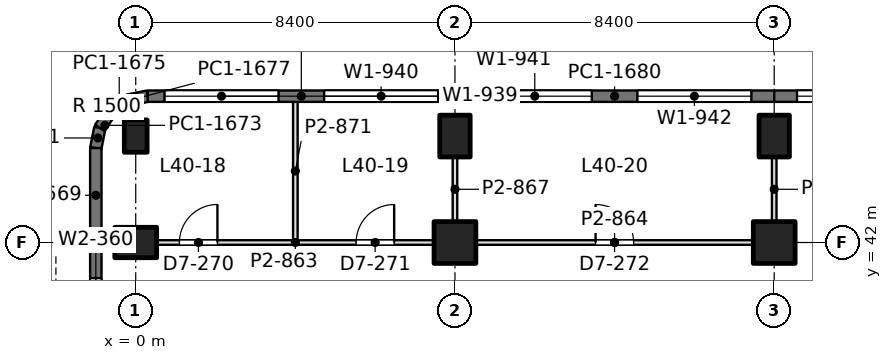
"""IFC4 building model, lengths in metres.
Left out: names, types, materials, properties, quantities, classifications, styles, units other than length and angle.
Written with IfcOpenShell. Run it as: python <this file> out.ifc"""

import sys

from ifc_helpers import new_model, si_unit, direction, frame, frame_2d, origin, origin_2d, place, context, subcontext, project, spatial, rectangle, extrude, element, fill, save


model = new_model("IFC4")
c1 = context("Model", 3, precision=1e-05, world=origin(), true_north=direction((0.0, 1.0)))
c2 = subcontext(c1, "Body", "Model", "MODEL_VIEW")
j1 = project(units=[si_unit("LENGTHUNIT", "METRE"), si_unit("PLANEANGLEUNIT", "RADIAN")], contexts=[c1])
p1 = place(None, origin())
s1 = spatial("IfcSite", under=j1, at=p1, CompositionType="ELEMENT")
p2 = place(p1, origin())
s2 = spatial("IfcBuilding", under=s1, at=p2, CompositionType="ELEMENT")
p3 = place(p2, frame((0.0, 0.0, 177.6)))
s3 = spatial("IfcBuildingStorey", under=s2, at=p3, CompositionType="ELEMENT", Elevation=177.6)
p4 = place(p3, frame((0.0, 42.0, 0.0), z_axis=(0.0, 0.0, 1.0), x_axis=(0.0, 1.0, 0.0)))
e1 = element("IfcColumn", 1, at=p4, inside=s3, PredefinedType="COLUMN", context=c2, shape_type="SweptSolid", body=[
    extrude(rectangle(XDim=0.8, YDim=1.1, at=origin_2d()), origin(), (0.0, 0.0, 1.0), 4.2),
])
p5 = place(p3, frame((0.0, 44.8, 0.0), z_axis=(0.0, 0.0, 1.0), x_axis=(1.0, 0.0, 0.0)))
e2 = element("IfcColumn", 2, at=p5, inside=s3, PredefinedType="COLUMN", context=c2, shape_type="SweptSolid", body=[
    extrude(rectangle(XDim=0.6, YDim=0.85, at=origin_2d()), origin(), (0.0, 0.0, 1.0), 4.2),
])
p6 = place(p3, frame((8.4, 42.0, 0.0), z_axis=(0.0, 0.0, 1.0), x_axis=(1.0, 0.0, 0.0)))
e3 = element("IfcColumn", 3, at=p6, inside=s3, PredefinedType="COLUMN", context=c2, shape_type="SweptSolid", body=[
    extrude(rectangle(XDim=1.1, YDim=1.1, at=origin_2d()), origin(), (0.0, 0.0, 1.0), 4.2),
])
p7 = place(p3, frame((8.4, 44.8, 0.0), z_axis=(0.0, 0.0, 1.0), x_axis=(1.0, 0.0, 0.0)))
e4 = element("IfcColumn", 4, at=p7, inside=s3, PredefinedType="COLUMN", context=c2, shape_type="SweptSolid", body=[
    extrude(rectangle(XDim=0.8, YDim=1.1, at=origin_2d()), origin(), (0.0, 0.0, 1.0), 4.2),
])
p8 = place(p3, frame((16.8, 42.0, 0.0), z_axis=(0.0, 0.0, 1.0), x_axis=(1.0, 0.0, 0.0)))
e5 = element("IfcColumn", 5, at=p8, inside=s3, PredefinedType="COLUMN", context=c2, shape_type="SweptSolid", body=[
    extrude(rectangle(XDim=1.1, YDim=1.1, at=origin_2d()), origin(), (0.0, 0.0, 1.0), 4.2),
])
p9 = place(p3, frame((16.8, 44.8, 0.0), z_axis=(0.0, 0.0, 1.0), x_axis=(1.0, 0.0, 0.0)))
e6 = element("IfcColumn", 6, at=p9, inside=s3, PredefinedType="COLUMN", context=c2, shape_type="SweptSolid", body=[
    extrude(rectangle(XDim=0.8, YDim=1.1, at=origin_2d()), origin(), (0.0, 0.0, 1.0), 4.2),
])
p10 = place(p3, frame((-1.05, 37.725, 0.0), z_axis=(0.0, 0.0, 1.0), x_axis=(0.0, 1.0, 0.0)))
e7 = element("IfcWall", 7, at=p10, inside=s3, PredefinedType="SOLIDWALL", context=c2, shape_type="SweptSolid", body=[
    extrude(rectangle(XDim=4.275, YDim=0.3, at=frame_2d((2.137, 0.0))), origin(), (0.0, 0.0, 1.0), 4.05),
])
p11 = place(p10, frame((0.938, 0.0, 0.9)))
e8 = element("IfcOpeningElement", 8, at=p11, cuts=e7, PredefinedType="OPENING", context=c2, shape_type="SweptSolid", body=[
    extrude(rectangle(XDim=2.4, YDim=1.9, at=frame_2d((1.2, 0.95))), frame((0.0, 0.16, 0.0), z_axis=(0.0, -1.0, 0.0), x_axis=(1.0, 0.0, 0.0)), (0.0, 0.0, 1.0), 0.32),
])
p12 = place(p3, frame((-1.05, 42.0, 0.0), z_axis=(0.0, 0.0, 1.0), x_axis=(0.0, 1.0, 0.0)))
e9 = element("IfcWall", 9, at=p12, inside=s3, PredefinedType="SOLIDWALL", context=c2, shape_type="SweptSolid", body=[
    extrude(rectangle(XDim=2.485, YDim=0.3, at=frame_2d((1.243, 0.0))), origin(), (0.0, 0.0, 1.0), 4.05),
])
p13 = place(p3, frame((-1.05, 44.485, 0.0), z_axis=(0.0, 0.0, 1.0), x_axis=(0.195073962632, 0.980788534345, 0.0)))
e10 = element("IfcWall", 10, at=p13, inside=s3, PredefinedType="SOLIDWALL", context=c2, shape_type="SweptSolid", body=[
    extrude(rectangle(XDim=0.541, YDim=0.3, at=frame_2d((0.271, 0.0))), origin(), (0.0, 0.0, 1.0), 4.05),
])
p14 = place(p3, frame((-0.945, 45.015, 0.0), z_axis=(0.0, 0.0, 1.0), x_axis=(0.55534295404, 0.831621430339, 0.0)))
e11 = element("IfcWall", 11, at=p14, inside=s3, PredefinedType="SOLIDWALL", context=c2, shape_type="SweptSolid", body=[
    extrude(rectangle(XDim=0.526, YDim=0.3, at=frame_2d((0.263, 0.0))), origin(), (0.0, 0.0, 1.0), 4.05),
])
p15 = place(p3, frame((-0.653, 45.453, 0.0), z_axis=(0.0, 0.0, 1.0), x_axis=(0.831692711774, 0.555236195849, 0.0)))
e12 = element("IfcWall", 12, at=p15, inside=s3, PredefinedType="SOLIDWALL", context=c2, shape_type="SweptSolid", body=[
    extrude(rectangle(XDim=0.525, YDim=0.3, at=frame_2d((0.263, 0.0))), origin(), (0.0, 0.0, 1.0), 4.05),
])
p16 = place(p3, frame((-0.216, 45.744, 0.0), z_axis=(0.0, 0.0, 1.0), x_axis=(0.980702050465, 0.1955082817, 0.0)))
e13 = element("IfcWall", 13, at=p16, inside=s3, PredefinedType="SOLIDWALL", context=c2, shape_type="SweptSolid", body=[
    extrude(rectangle(XDim=0.541, YDim=0.3, at=frame_2d((0.271, 0.0))), origin(), (0.0, 0.0, 1.0), 4.05),
])
p17 = place(p3, frame((0.315, 45.85, 0.0), z_axis=(0.0, 0.0, 1.0), x_axis=(1.0, 0.0, 0.0)))
e14 = element("IfcWall", 14, at=p17, inside=s3, PredefinedType="SOLIDWALL", context=c2, shape_type="SweptSolid", body=[
    extrude(rectangle(XDim=8.085, YDim=0.3, at=frame_2d((4.042, 0.0))), origin(), (0.0, 0.0, 1.0), 4.05),
])
p18 = place(p17, frame((0.443, 0.0, 0.9)))
e15 = element("IfcOpeningElement", 15, at=p18, cuts=e14, PredefinedType="OPENING", context=c2, shape_type="SweptSolid", body=[
    extrude(rectangle(XDim=3.0, YDim=1.9, at=frame_2d((1.5, 0.95))), frame((0.0, 0.16, 0.0), z_axis=(0.0, -1.0, 0.0), x_axis=(1.0, 0.0, 0.0)), (0.0, 0.0, 1.0), 0.32),
])
p19 = place(p17, frame((4.643, 0.0, 0.9)))
e16 = element("IfcOpeningElement", 16, at=p19, cuts=e14, PredefinedType="OPENING", context=c2, shape_type="SweptSolid", body=[
    extrude(rectangle(XDim=3.0, YDim=1.9, at=frame_2d((1.5, 0.95))), frame((0.0, 0.16, 0.0), z_axis=(0.0, -1.0, 0.0), x_axis=(1.0, 0.0, 0.0)), (0.0, 0.0, 1.0), 0.32),
])
p20 = place(p3, frame((8.4, 45.85, 0.0), z_axis=(0.0, 0.0, 1.0), x_axis=(1.0, 0.0, 0.0)))
e17 = element("IfcWall", 17, at=p20, inside=s3, PredefinedType="SOLIDWALL", context=c2, shape_type="SweptSolid", body=[
    extrude(rectangle(XDim=8.4, YDim=0.3, at=frame_2d((4.2, 0.0))), origin(), (0.0, 0.0, 1.0), 4.05),
])
p21 = place(p20, frame((0.6, 0.0, 0.9)))
e18 = element("IfcOpeningElement", 18, at=p21, cuts=e17, PredefinedType="OPENING", context=c2, shape_type="SweptSolid", body=[
    extrude(rectangle(XDim=3.0, YDim=1.9, at=frame_2d((1.5, 0.95))), frame((0.0, 0.16, 0.0), z_axis=(0.0, -1.0, 0.0), x_axis=(1.0, 0.0, 0.0)), (0.0, 0.0, 1.0), 0.32),
])
p22 = place(p20, frame((4.8, 0.0, 0.9)))
e19 = element("IfcOpeningElement", 19, at=p22, cuts=e17, PredefinedType="OPENING", context=c2, shape_type="SweptSolid", body=[
    extrude(rectangle(XDim=3.0, YDim=1.9, at=frame_2d((1.5, 0.95))), frame((0.0, 0.16, 0.0), z_axis=(0.0, -1.0, 0.0), x_axis=(1.0, 0.0, 0.0)), (0.0, 0.0, 1.0), 0.32),
])
p23 = place(p3, frame((16.8, 45.85, 0.0), z_axis=(0.0, 0.0, 1.0), x_axis=(1.0, 0.0, 0.0)))
e20 = element("IfcWall", 20, at=p23, inside=s3, PredefinedType="SOLIDWALL", context=c2, shape_type="SweptSolid", body=[
    extrude(rectangle(XDim=8.4, YDim=0.3, at=frame_2d((4.2, 0.0))), origin(), (0.0, 0.0, 1.0), 4.05),
])
p24 = place(p23, frame((0.6, 0.0, 0.9)))
e21 = element("IfcOpeningElement", 21, at=p24, cuts=e20, PredefinedType="OPENING", context=c2, shape_type="SweptSolid", body=[
    extrude(rectangle(XDim=3.0, YDim=1.9, at=frame_2d((1.5, 0.95))), frame((0.0, 0.16, 0.0), z_axis=(0.0, -1.0, 0.0), x_axis=(1.0, 0.0, 0.0)), (0.0, 0.0, 1.0), 0.32),
])
p25 = place(p23, frame((4.8, 0.0, 0.9)))
e22 = element("IfcOpeningElement", 22, at=p25, cuts=e20, PredefinedType="OPENING", context=c2, shape_type="SweptSolid", body=[
    extrude(rectangle(XDim=3.0, YDim=1.9, at=frame_2d((1.5, 0.95))), frame((0.0, 0.16, 0.0), z_axis=(0.0, -1.0, 0.0), x_axis=(1.0, 0.0, 0.0)), (0.0, 0.0, 1.0), 0.32),
])
p26 = place(p3, frame((0.549, 42.0, 0.0), z_axis=(0.0, 0.0, 1.0), x_axis=(1.0, 0.0, 0.0)))
e23 = element("IfcWall", 23, at=p26, inside=s3, PredefinedType="PARTITIONING", context=c2, shape_type="SweptSolid", body=[
    extrude(rectangle(XDim=7.302, YDim=0.12, at=frame_2d((3.651, 0.0))), origin(), (0.0, 0.0, 1.0), 3.55),
])
p27 = place(p26, frame((0.601, 0.0, 0.0)))
e24 = element("IfcOpeningElement", 24, at=p27, cuts=e23, PredefinedType="OPENING", context=c2, shape_type="SweptSolid", body=[
    extrude(rectangle(XDim=1.0, YDim=2.4, at=frame_2d((0.5, 1.2))), frame((0.0, 0.07, 0.0), z_axis=(0.0, -1.0, 0.0), x_axis=(1.0, 0.0, 0.0)), (0.0, 0.0, 1.0), 0.14),
])
p28 = place(p26, frame((5.251, 0.0, 0.0)))
e25 = element("IfcOpeningElement", 25, at=p28, cuts=e23, PredefinedType="OPENING", context=c2, shape_type="SweptSolid", body=[
    extrude(rectangle(XDim=1.0, YDim=2.4, at=frame_2d((0.5, 1.2))), frame((0.0, 0.07, 0.0), z_axis=(0.0, -1.0, 0.0), x_axis=(1.0, 0.0, 0.0)), (0.0, 0.0, 1.0), 0.14),
])
p29 = place(p3, frame((8.949, 42.0, 0.0), z_axis=(0.0, 0.0, 1.0), x_axis=(1.0, 0.0, 0.0)))
e26 = element("IfcWall", 26, at=p29, inside=s3, PredefinedType="PARTITIONING", context=c2, shape_type="SweptSolid", body=[
    extrude(rectangle(XDim=7.302, YDim=0.12, at=frame_2d((3.651, 0.0))), origin(), (0.0, 0.0, 1.0), 3.55),
])
p30 = place(p29, frame((3.151, 0.0, 0.0)))
e27 = element("IfcOpeningElement", 27, at=p30, cuts=e26, PredefinedType="OPENING", context=c2, shape_type="SweptSolid", body=[
    extrude(rectangle(XDim=1.0, YDim=2.4, at=frame_2d((0.5, 1.2))), frame((0.0, 0.07, 0.0), z_axis=(0.0, -1.0, 0.0), x_axis=(1.0, 0.0, 0.0)), (0.0, 0.0, 1.0), 0.14),
])
p31 = place(p3, frame((4.2, 42.058, 0.0), z_axis=(0.0, 0.0, 1.0), x_axis=(0.0, 1.0, 0.0)))
e28 = element("IfcWall", 28, at=p31, inside=s3, PredefinedType="PARTITIONING", context=c2, shape_type="SweptSolid", body=[
    extrude(rectangle(XDim=3.644, YDim=0.12, at=frame_2d((1.822, 0.0))), origin(), (0.0, 0.0, 1.0), 3.55),
])
for number, where, z_axis, x_axis in (
    (29, (8.4, 42.549, 0.0), (0.0, 0.0, 1.0), (0.0, 1.0, 0.0)),
    (30, (16.8, 42.549, 0.0), (0.0, 0.0, 1.0), (0.0, 1.0, 0.0)),
):
    element("IfcWall", number, at=place(p3, frame(where, z_axis=z_axis, x_axis=x_axis)), inside=s3, PredefinedType="PARTITIONING", context=c2, shape_type="SweptSolid", body=[
        extrude(rectangle(XDim=1.702, YDim=0.12, at=frame_2d((0.851, 0.0))), origin(), (0.0, 0.0, 1.0), 3.69),
    ])
p32 = place(p11, origin())
e31 = element("IfcWindow", 31, at=p32, inside=s3, PartitioningType="SINGLE_PANEL", PredefinedType="WINDOW", context=c2, shape_type="SweptSolid", body=[
    extrude(rectangle(XDim=2.4, YDim=1.9, at=frame_2d((1.2, 0.95))), frame((0.0, 0.03, 0.0), z_axis=(0.0, -1.0, 0.0), x_axis=(1.0, 0.0, 0.0)), (0.0, 0.0, 1.0), 0.06),
])
fill(e8, e31)
p33 = place(p18, origin())
e32 = element("IfcWindow", 32, at=p33, inside=s3, PartitioningType="SINGLE_PANEL", PredefinedType="WINDOW", context=c2, shape_type="SweptSolid", body=[
    extrude(rectangle(XDim=3.0, YDim=1.9, at=frame_2d((1.5, 0.95))), frame((0.0, 0.03, 0.0), z_axis=(0.0, -1.0, 0.0), x_axis=(1.0, 0.0, 0.0)), (0.0, 0.0, 1.0), 0.06),
])
fill(e15, e32)
p34 = place(p19, origin())
e33 = element("IfcWindow", 33, at=p34, inside=s3, PartitioningType="SINGLE_PANEL", PredefinedType="WINDOW", context=c2, shape_type="SweptSolid", body=[
    extrude(rectangle(XDim=3.0, YDim=1.9, at=frame_2d((1.5, 0.95))), frame((0.0, 0.03, 0.0), z_axis=(0.0, -1.0, 0.0), x_axis=(1.0, 0.0, 0.0)), (0.0, 0.0, 1.0), 0.06),
])
fill(e16, e33)
p35 = place(p21, origin())
e34 = element("IfcWindow", 34, at=p35, inside=s3, PartitioningType="SINGLE_PANEL", PredefinedType="WINDOW", context=c2, shape_type="SweptSolid", body=[
    extrude(rectangle(XDim=3.0, YDim=1.9, at=frame_2d((1.5, 0.95))), frame((0.0, 0.03, 0.0), z_axis=(0.0, -1.0, 0.0), x_axis=(1.0, 0.0, 0.0)), (0.0, 0.0, 1.0), 0.06),
])
fill(e18, e34)
p36 = place(p22, origin())
e35 = element("IfcWindow", 35, at=p36, inside=s3, PartitioningType="SINGLE_PANEL", PredefinedType="WINDOW", context=c2, shape_type="SweptSolid", body=[
    extrude(rectangle(XDim=3.0, YDim=1.9, at=frame_2d((1.5, 0.95))), frame((0.0, 0.03, 0.0), z_axis=(0.0, -1.0, 0.0), x_axis=(1.0, 0.0, 0.0)), (0.0, 0.0, 1.0), 0.06),
])
fill(e19, e35)
p37 = place(p24, origin())
e36 = element("IfcWindow", 36, at=p37, inside=s3, PartitioningType="SINGLE_PANEL", PredefinedType="WINDOW", context=c2, shape_type="SweptSolid", body=[
    extrude(rectangle(XDim=3.0, YDim=1.9, at=frame_2d((1.5, 0.95))), frame((0.0, 0.03, 0.0), z_axis=(0.0, -1.0, 0.0), x_axis=(1.0, 0.0, 0.0)), (0.0, 0.0, 1.0), 0.06),
])
fill(e21, e36)
p38 = place(p27, origin())
e37 = element("IfcDoor", 37, at=p38, inside=s3, OperationType="SINGLE_SWING_RIGHT", PredefinedType="DOOR", context=c2, shape_type="SweptSolid", body=[
    extrude(rectangle(XDim=1.0, YDim=2.4, at=frame_2d((0.5, 1.2))), frame((0.0, 0.025, 0.0), z_axis=(0.0, -1.0, 0.0), x_axis=(1.0, 0.0, 0.0)), (0.0, 0.0, 1.0), 0.05),
])
fill(e24, e37)
p39 = place(p28, origin())
e38 = element("IfcDoor", 38, at=p39, inside=s3, OperationType="SINGLE_SWING_RIGHT", PredefinedType="DOOR", context=c2, shape_type="SweptSolid", body=[
    extrude(rectangle(XDim=1.0, YDim=2.4, at=frame_2d((0.5, 1.2))), frame((0.0, 0.025, 0.0), z_axis=(0.0, -1.0, 0.0), x_axis=(1.0, 0.0, 0.0)), (0.0, 0.0, 1.0), 0.05),
])
fill(e25, e38)
p40 = place(p30, origin())
e39 = element("IfcDoor", 39, at=p40, inside=s3, OperationType="SINGLE_SWING_LEFT", PredefinedType="DOOR", context=c2, shape_type="SweptSolid", body=[
    extrude(rectangle(XDim=1.0, YDim=2.4, at=frame_2d((0.5, 1.2))), frame((0.0, 0.025, 0.0), z_axis=(0.0, -1.0, 0.0), x_axis=(1.0, 0.0, 0.0)), (0.0, 0.0, 1.0), 0.05),
])
fill(e27, e39)
save(model, sys.argv[1])
